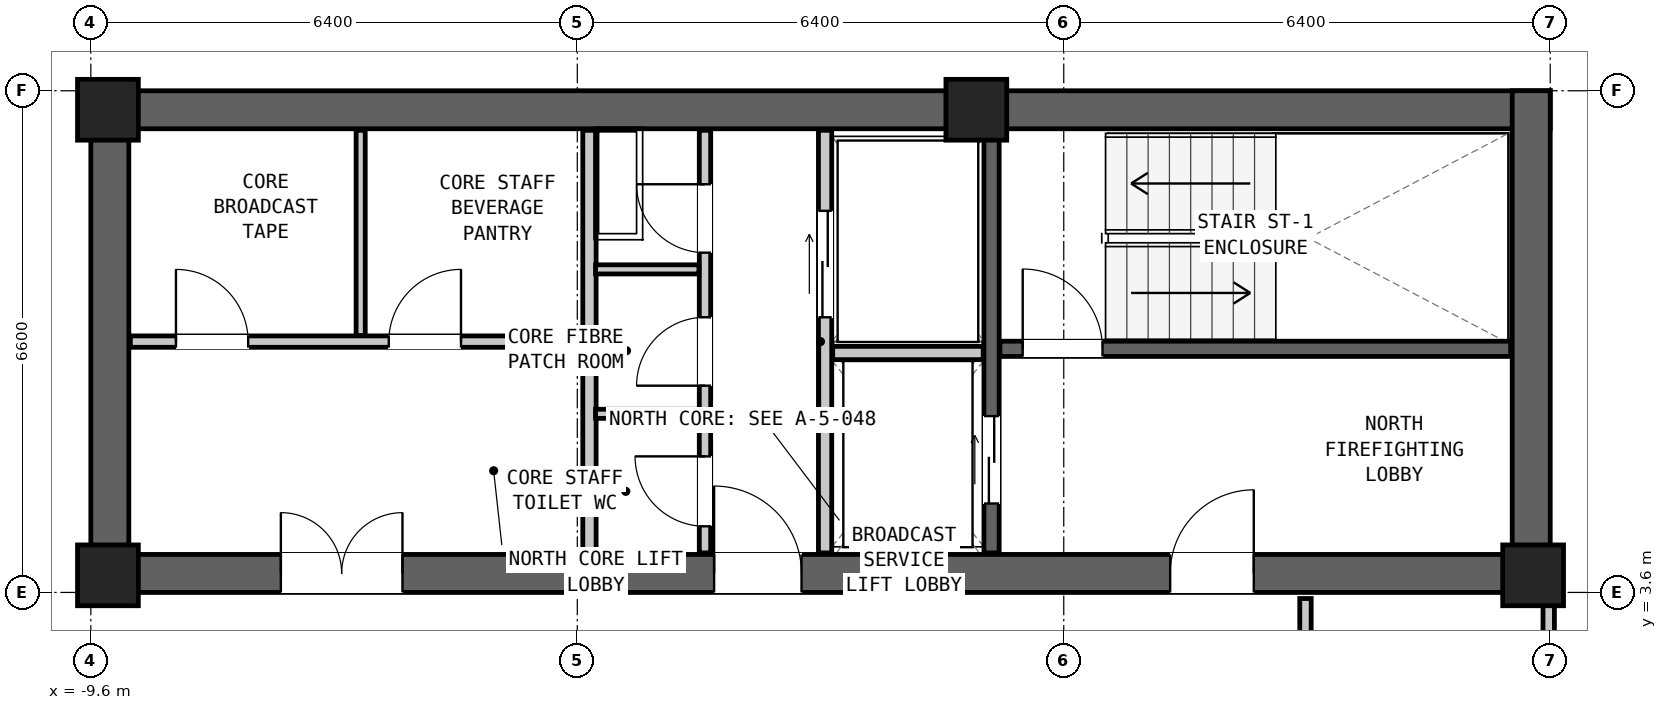
"""IFC4 building model, lengths in metres.
Left out: names, types, materials, properties, quantities, classifications, styles, units other than length and angle.
Written with IfcOpenShell. Run it as: python <this file> out.ifc"""

import sys

from ifc_helpers import new_model, si_unit, direction, frame, frame_2d, origin, origin_2d, place, context, subcontext, project, spatial, rectangle, extrude, element, fill, save


model = new_model("IFC4")
c1 = context("Model", 3, precision=1e-05, world=origin(), true_north=direction((0.0, 1.0)))
c2 = subcontext(c1, "Body", "Model", "MODEL_VIEW")
j1 = project(units=[si_unit("LENGTHUNIT", "METRE"), si_unit("PLANEANGLEUNIT", "RADIAN")], contexts=[c1])
p1 = place(None, origin())
s1 = spatial("IfcSite", under=j1, at=p1, CompositionType="ELEMENT")
p2 = place(p1, origin())
s2 = spatial("IfcBuilding", under=s1, at=p2, CompositionType="ELEMENT")
p3 = place(p2, frame((0.0, 0.0, 156.15)))
s3 = spatial("IfcBuildingStorey", under=s2, at=p3, CompositionType="ELEMENT", Elevation=156.15)
p4 = place(p3, frame((-9.6, 9.95, 0.0), z_axis=(0.0, 0.0, 1.0), x_axis=(1.0, 0.0, 0.0)))
e1 = element("IfcWall", 1, at=p4, inside=s3, PredefinedType="SHEAR", context=c2, shape_type="SweptSolid", body=[
    extrude(rectangle(XDim=19.2, YDim=0.5, at=frame_2d((9.6, 0.0))), origin(), (0.0, 0.0, 1.0), 3.05),
])
p5 = place(p3, frame((-9.6, 3.85, 0.0), z_axis=(0.0, 0.0, 1.0), x_axis=(1.0, 0.0, 0.0)))
e2 = element("IfcWall", 2, at=p5, inside=s3, PredefinedType="SHEAR", context=c2, shape_type="SweptSolid", body=[
    extrude(rectangle(XDim=19.2, YDim=0.5, at=frame_2d((9.6, 0.0))), origin(), (0.0, 0.0, 1.0), 3.05),
])
p6 = place(p5, frame((14.2, 0.0, 0.0)))
e3 = element("IfcOpeningElement", 3, at=p6, cuts=e2, PredefinedType="OPENING", context=c2, shape_type="SweptSolid", body=[
    extrude(rectangle(XDim=1.1, YDim=2.08, at=frame_2d((0.55, 1.04))), frame((0.0, 0.262, 0.0), z_axis=(0.0, -1.0, 0.0), x_axis=(1.0, 0.0, 0.0)), (0.0, 0.0, 1.0), 0.524),
])
p7 = place(p5, frame((8.2, 0.0, 0.0)))
e4 = element("IfcOpeningElement", 4, at=p7, cuts=e2, PredefinedType="OPENING", context=c2, shape_type="SweptSolid", body=[
    extrude(rectangle(XDim=1.15, YDim=2.1, at=frame_2d((0.575, 1.05))), frame((0.0, 0.262, 0.0), z_axis=(0.0, -1.0, 0.0), x_axis=(1.0, 0.0, 0.0)), (0.0, 0.0, 1.0), 0.524),
])
p8 = place(p5, frame((2.5, 0.0, 0.0)))
e5 = element("IfcOpeningElement", 5, at=p8, cuts=e2, PredefinedType="OPENING", context=c2, shape_type="SweptSolid", body=[
    extrude(rectangle(XDim=1.6, YDim=2.12, at=frame_2d((0.8, 1.06))), frame((0.0, 0.262, 0.0), z_axis=(0.0, -1.0, 0.0), x_axis=(1.0, 0.0, 0.0)), (0.0, 0.0, 1.0), 0.524),
])
for number, where, z_axis, x_axis in (
    (6, (-9.35, 3.6, 0.0), (0.0, 0.0, 1.0), (0.0, 1.0, 0.0)),
    (7, (9.35, 3.6, 0.0), (0.0, 0.0, 1.0), (0.0, 1.0, 0.0)),
):
    element("IfcWall", number, at=place(p3, frame(where, z_axis=z_axis, x_axis=x_axis)), inside=s3, PredefinedType="SHEAR", context=c2, shape_type="SweptSolid", body=[
        extrude(rectangle(XDim=6.6, YDim=0.5, at=frame_2d((3.3, 0.0))), origin(), (0.0, 0.0, 1.0), 3.05),
    ])
for number, where, z_axis, x_axis in (
    (8, (-9.375, 9.95, 0.0), (0.0, 0.0, 1.0), (1.0, 0.0, 0.0)),
    (9, (2.05, 9.95, 0.0), (0.0, 0.0, 1.0), (1.0, 0.0, 0.0)),
    (10, (-9.375, 3.825, 0.0), (0.0, 0.0, 1.0), (1.0, 0.0, 0.0)),
    (11, (9.375, 3.825, 0.0), (0.0, 0.0, 1.0), (1.0, 0.0, 0.0)),
):
    element("IfcColumn", number, at=place(p3, frame(where, z_axis=z_axis, x_axis=x_axis)), inside=s3, PredefinedType="COLUMN", context=c2, shape_type="SweptSolid", body=[
        extrude(rectangle(XDim=0.8, YDim=0.8, at=origin_2d()), origin(), (0.0, 0.0, 1.0), 3.05),
    ])
p9 = place(p3, frame((2.36, 6.805, 0.0), z_axis=(0.0, 0.0, 1.0), x_axis=(1.0, 0.0, 0.0)))
e12 = element("IfcWall", 12, at=p9, inside=s3, PredefinedType="SHEAR", context=c2, shape_type="SweptSolid", body=[
    extrude(rectangle(XDim=6.72, YDim=0.2, at=frame_2d((3.36, 0.0))), origin(), (0.0, 0.0, 1.0), 2.83),
])
p10 = place(p9, frame((0.3, 0.0, 0.0)))
e13 = element("IfcOpeningElement", 13, at=p10, cuts=e12, PredefinedType="OPENING", context=c2, shape_type="SweptSolid", body=[
    extrude(rectangle(XDim=1.05, YDim=2.08, at=frame_2d((0.525, 1.04))), frame((0.0, 0.112, 0.0), z_axis=(0.0, -1.0, 0.0), x_axis=(1.0, 0.0, 0.0)), (0.0, 0.0, 1.0), 0.224),
])
p11 = place(p3, frame((2.25, 4.12, 0.0), z_axis=(0.0, 0.0, 1.0), x_axis=(0.0, 1.0, 0.0)))
e14 = element("IfcWall", 14, at=p11, inside=s3, PredefinedType="SHEAR", context=c2, shape_type="SweptSolid", body=[
    extrude(rectangle(XDim=5.56, YDim=0.2, at=frame_2d((2.78, 0.0))), origin(), (0.0, 0.0, 1.0), 2.83),
])
p12 = place(p11, frame((0.65, 0.0, 0.0)))
e15 = element("IfcOpeningElement", 15, at=p12, cuts=e14, PredefinedType="OPENING", context=c2, shape_type="SweptSolid", body=[
    extrude(rectangle(XDim=1.15, YDim=2.08, at=frame_2d((0.575, 1.04))), frame((0.0, 0.112, 0.0), z_axis=(0.0, -1.0, 0.0), x_axis=(1.0, 0.0, 0.0)), (0.0, 0.0, 1.0), 0.224),
])
p13 = place(p3, frame((0.06, 4.12, 0.0), z_axis=(0.0, 0.0, 1.0), x_axis=(0.0, 1.0, 0.0)))
e16 = element("IfcWall", 16, at=p13, inside=s3, PredefinedType="PARTITIONING", context=c2, shape_type="SweptSolid", body=[
    extrude(rectangle(XDim=5.56, YDim=0.175, at=frame_2d((2.78, 0.0))), origin(), (0.0, 0.0, 1.0), 2.83),
])
p14 = place(p13, frame((3.1, 0.0, 0.0)))
e17 = element("IfcOpeningElement", 17, at=p14, cuts=e16, PredefinedType="OPENING", context=c2, shape_type="SweptSolid", body=[
    extrude(rectangle(XDim=1.4, YDim=2.12, at=frame_2d((0.7, 1.06))), frame((0.0, 0.1, 0.0), z_axis=(0.0, -1.0, 0.0), x_axis=(1.0, 0.0, 0.0)), (0.0, 0.0, 1.0), 0.199),
])
p15 = place(p3, frame((0.16, 6.75, 0.0), z_axis=(0.0, 0.0, 1.0), x_axis=(1.0, 0.0, 0.0)))
e18 = element("IfcWall", 18, at=p15, inside=s3, PredefinedType="PARTITIONING", context=c2, shape_type="SweptSolid", body=[
    extrude(rectangle(XDim=1.98, YDim=0.175, at=frame_2d((0.99, 0.0))), origin(), (0.0, 0.0, 1.0), 2.83),
])
p16 = place(p3, frame((-3.04, 4.12, 0.0), z_axis=(0.0, 0.0, 1.0), x_axis=(0.0, 1.0, 0.0)))
e19 = element("IfcWall", 19, at=p16, inside=s3, PredefinedType="PARTITIONING", context=c2, shape_type="SweptSolid", body=[
    extrude(rectangle(XDim=5.56, YDim=0.175, at=frame_2d((2.78, 0.0))), origin(), (0.0, 0.0, 1.0), 2.83),
])
p17 = place(p3, frame((-1.52, 4.12, 0.0), z_axis=(0.0, 0.0, 1.0), x_axis=(0.0, 1.0, 0.0)))
e20 = element("IfcWall", 20, at=p17, inside=s3, PredefinedType="PARTITIONING", context=c2, shape_type="SweptSolid", body=[
    extrude(rectangle(XDim=5.56, YDim=0.15, at=frame_2d((2.78, 0.0))), origin(), (0.0, 0.0, 1.0), 2.83),
])
p18 = place(p17, frame((3.95, 0.0, 0.0)))
e21 = element("IfcOpeningElement", 21, at=p18, cuts=e20, PredefinedType="OPENING", context=c2, shape_type="SweptSolid", body=[
    extrude(rectangle(XDim=0.9, YDim=2.05, at=frame_2d((0.45, 1.025))), frame((0.0, 0.087, 0.0), z_axis=(0.0, -1.0, 0.0), x_axis=(1.0, 0.0, 0.0)), (0.0, 0.0, 1.0), 0.174),
])
p19 = place(p17, frame((2.2, 0.0, 0.0)))
e22 = element("IfcOpeningElement", 22, at=p19, cuts=e20, PredefinedType="OPENING", context=c2, shape_type="SweptSolid", body=[
    extrude(rectangle(XDim=0.9, YDim=2.05, at=frame_2d((0.45, 1.025))), frame((0.0, 0.087, 0.0), z_axis=(0.0, -1.0, 0.0), x_axis=(1.0, 0.0, 0.0)), (0.0, 0.0, 1.0), 0.174),
])
p20 = place(p17, frame((0.35, 0.0, 0.0)))
e23 = element("IfcOpeningElement", 23, at=p20, cuts=e20, PredefinedType="OPENING", context=c2, shape_type="SweptSolid", body=[
    extrude(rectangle(XDim=0.92, YDim=2.1, at=frame_2d((0.46, 1.05))), frame((0.0, 0.087, 0.0), z_axis=(0.0, -1.0, 0.0), x_axis=(1.0, 0.0, 0.0)), (0.0, 0.0, 1.0), 0.174),
])
for number, where, z_axis, x_axis in (
    (24, (-2.96, 5.95, 0.0), (0.0, 0.0, 1.0), (1.0, 0.0, 0.0)),
    (25, (-2.96, 7.85, 0.0), (0.0, 0.0, 1.0), (1.0, 0.0, 0.0)),
):
    element("IfcWall", number, at=place(p3, frame(where, z_axis=z_axis, x_axis=x_axis)), inside=s3, PredefinedType="PARTITIONING", context=c2, shape_type="SweptSolid", body=[
        extrude(rectangle(XDim=1.36, YDim=0.12, at=frame_2d((0.68, 0.0))), origin(), (0.0, 0.0, 1.0), 2.83),
    ])
p21 = place(p3, frame((-9.08, 6.9, 0.0), z_axis=(0.0, 0.0, 1.0), x_axis=(1.0, 0.0, 0.0)))
e26 = element("IfcWall", 26, at=p21, inside=s3, PredefinedType="PARTITIONING", context=c2, shape_type="SweptSolid", body=[
    extrude(rectangle(XDim=5.96, YDim=0.15, at=frame_2d((2.98, 0.0))), origin(), (0.0, 0.0, 1.0), 2.83),
])
p22 = place(p21, frame((0.6, 0.0, 0.0)))
e27 = element("IfcOpeningElement", 27, at=p22, cuts=e26, PredefinedType="OPENING", context=c2, shape_type="SweptSolid", body=[
    extrude(rectangle(XDim=0.95, YDim=2.1, at=frame_2d((0.475, 1.05))), frame((0.0, 0.087, 0.0), z_axis=(0.0, -1.0, 0.0), x_axis=(1.0, 0.0, 0.0)), (0.0, 0.0, 1.0), 0.174),
])
p23 = place(p21, frame((3.4, 0.0, 0.0)))
e28 = element("IfcOpeningElement", 28, at=p23, cuts=e26, PredefinedType="OPENING", context=c2, shape_type="SweptSolid", body=[
    extrude(rectangle(XDim=0.95, YDim=2.1, at=frame_2d((0.475, 1.05))), frame((0.0, 0.087, 0.0), z_axis=(0.0, -1.0, 0.0), x_axis=(1.0, 0.0, 0.0)), (0.0, 0.0, 1.0), 0.174),
])
p24 = place(p3, frame((-6.05, 6.98, 0.0), z_axis=(0.0, 0.0, 1.0), x_axis=(0.0, 1.0, 0.0)))
e29 = element("IfcWall", 29, at=p24, inside=s3, PredefinedType="PARTITIONING", context=c2, shape_type="SweptSolid", body=[
    extrude(rectangle(XDim=2.7, YDim=0.12, at=frame_2d((1.35, 0.0))), origin(), (0.0, 0.0, 1.0), 2.83),
])
p25 = place(p3, frame((6.38, -2.32, 0.0), z_axis=(0.0, 0.0, 1.0), x_axis=(0.0, 1.0, 0.0)))
e30 = element("IfcWall", 30, at=p25, inside=s3, PredefinedType="PARTITIONING", context=c2, shape_type="SweptSolid", body=[
    extrude(rectangle(XDim=5.84, YDim=0.15, at=frame_2d((2.92, 0.0))), origin(), (0.0, 0.0, 1.0), 2.198),
])
p26 = place(p3, frame((9.58, -2.32, 0.0), z_axis=(0.0, 0.0, 1.0), x_axis=(0.0, 1.0, 0.0)))
e31 = element("IfcWall", 31, at=p26, inside=s3, PredefinedType="PARTITIONING", context=c2, shape_type="SweptSolid", body=[
    extrude(rectangle(XDim=5.84, YDim=0.15, at=frame_2d((2.92, 0.0))), origin(), (0.0, 0.0, 1.0), 2.198),
])
p27 = place(p26, frame((2.445, 0.0, 0.0)))
e32 = element("IfcOpeningElement", 32, at=p27, cuts=e31, PredefinedType="OPENING", context=c2, shape_type="SweptSolid", body=[
    extrude(rectangle(XDim=0.95, YDim=2.1, at=frame_2d((0.475, 1.05))), frame((0.0, 0.087, 0.0), z_axis=(0.0, -1.0, 0.0), x_axis=(1.0, 0.0, 0.0)), (0.0, 0.0, 1.0), 0.174),
])
p28 = place(p10, origin())
e33 = element("IfcDoor", 33, at=p28, inside=s3, OperationType="SINGLE_SWING_LEFT", PredefinedType="DOOR", context=c2, shape_type="SweptSolid", body=[
    extrude(rectangle(XDim=1.05, YDim=2.08, at=frame_2d((0.525, 1.04))), frame((0.0, 0.025, 0.0), z_axis=(0.0, -1.0, 0.0), x_axis=(1.0, 0.0, 0.0)), (0.0, 0.0, 1.0), 0.05),
])
fill(e13, e33)
p29 = place(p6, origin())
e34 = element("IfcDoor", 34, at=p29, inside=s3, OperationType="SINGLE_SWING_RIGHT", PredefinedType="DOOR", context=c2, shape_type="SweptSolid", body=[
    extrude(rectangle(XDim=1.1, YDim=2.08, at=frame_2d((0.55, 1.04))), frame((0.0, 0.025, 0.0), z_axis=(0.0, -1.0, 0.0), x_axis=(1.0, 0.0, 0.0)), (0.0, 0.0, 1.0), 0.05),
])
fill(e3, e34)
p30 = place(p12, origin())
e35 = element("IfcDoor", 35, at=p30, inside=s3, OperationType="DOUBLE_DOOR_SLIDING", PredefinedType="DOOR", context=c2, shape_type="SweptSolid", body=[
    extrude(rectangle(XDim=1.15, YDim=2.08, at=frame_2d((0.575, 1.04))), frame((0.0, 0.025, 0.0), z_axis=(0.0, -1.0, 0.0), x_axis=(1.0, 0.0, 0.0)), (0.0, 0.0, 1.0), 0.05),
])
fill(e15, e35)
p31 = place(p14, origin())
e36 = element("IfcDoor", 36, at=p31, inside=s3, OperationType="DOUBLE_DOOR_SLIDING", PredefinedType="DOOR", context=c2, shape_type="SweptSolid", body=[
    extrude(rectangle(XDim=1.4, YDim=2.12, at=frame_2d((0.7, 1.06))), frame((0.0, 0.025, 0.0), z_axis=(0.0, -1.0, 0.0), x_axis=(1.0, 0.0, 0.0)), (0.0, 0.0, 1.0), 0.05),
])
fill(e17, e36)
p32 = place(p7, origin())
e37 = element("IfcDoor", 37, at=p32, inside=s3, OperationType="SINGLE_SWING_LEFT", PredefinedType="DOOR", context=c2, shape_type="SweptSolid", body=[
    extrude(rectangle(XDim=1.15, YDim=2.1, at=frame_2d((0.575, 1.05))), frame((0.0, 0.025, 0.0), z_axis=(0.0, -1.0, 0.0), x_axis=(1.0, 0.0, 0.0)), (0.0, 0.0, 1.0), 0.05),
])
fill(e4, e37)
p33 = place(p18, origin())
e38 = element("IfcDoor", 38, at=p33, inside=s3, OperationType="SINGLE_SWING_RIGHT", PredefinedType="DOOR", context=c2, shape_type="SweptSolid", body=[
    extrude(rectangle(XDim=0.9, YDim=2.05, at=frame_2d((0.45, 1.025))), frame((0.0, 0.025, 0.0), z_axis=(0.0, -1.0, 0.0), x_axis=(1.0, 0.0, 0.0)), (0.0, 0.0, 1.0), 0.05),
])
fill(e21, e38)
p34 = place(p19, origin())
e39 = element("IfcDoor", 39, at=p34, inside=s3, OperationType="SINGLE_SWING_LEFT", PredefinedType="DOOR", context=c2, shape_type="SweptSolid", body=[
    extrude(rectangle(XDim=0.9, YDim=2.05, at=frame_2d((0.45, 1.025))), frame((0.0, 0.025, 0.0), z_axis=(0.0, -1.0, 0.0), x_axis=(1.0, 0.0, 0.0)), (0.0, 0.0, 1.0), 0.05),
])
fill(e22, e39)
p35 = place(p20, origin())
e40 = element("IfcDoor", 40, at=p35, inside=s3, OperationType="SINGLE_SWING_RIGHT", PredefinedType="DOOR", context=c2, shape_type="SweptSolid", body=[
    extrude(rectangle(XDim=0.92, YDim=2.1, at=frame_2d((0.46, 1.05))), frame((0.0, 0.025, 0.0), z_axis=(0.0, -1.0, 0.0), x_axis=(1.0, 0.0, 0.0)), (0.0, 0.0, 1.0), 0.05),
])
fill(e23, e40)
p36 = place(p8, origin())
e41 = element("IfcDoor", 41, at=p36, inside=s3, OperationType="DOUBLE_DOOR_SINGLE_SWING", PredefinedType="DOOR", context=c2, shape_type="SweptSolid", body=[
    extrude(rectangle(XDim=1.6, YDim=2.12, at=frame_2d((0.8, 1.06))), frame((0.0, 0.025, 0.0), z_axis=(0.0, -1.0, 0.0), x_axis=(1.0, 0.0, 0.0)), (0.0, 0.0, 1.0), 0.05),
])
fill(e5, e41)
p37 = place(p22, origin())
e42 = element("IfcDoor", 42, at=p37, inside=s3, OperationType="SINGLE_SWING_LEFT", PredefinedType="DOOR", context=c2, shape_type="SweptSolid", body=[
    extrude(rectangle(XDim=0.95, YDim=2.1, at=frame_2d((0.475, 1.05))), frame((0.0, 0.025, 0.0), z_axis=(0.0, -1.0, 0.0), x_axis=(1.0, 0.0, 0.0)), (0.0, 0.0, 1.0), 0.05),
])
fill(e27, e42)
p38 = place(p23, origin())
e43 = element("IfcDoor", 43, at=p38, inside=s3, OperationType="SINGLE_SWING_RIGHT", PredefinedType="DOOR", context=c2, shape_type="SweptSolid", body=[
    extrude(rectangle(XDim=0.95, YDim=2.1, at=frame_2d((0.475, 1.05))), frame((0.0, 0.025, 0.0), z_axis=(0.0, -1.0, 0.0), x_axis=(1.0, 0.0, 0.0)), (0.0, 0.0, 1.0), 0.05),
])
fill(e28, e43)
save(model, sys.argv[1])
